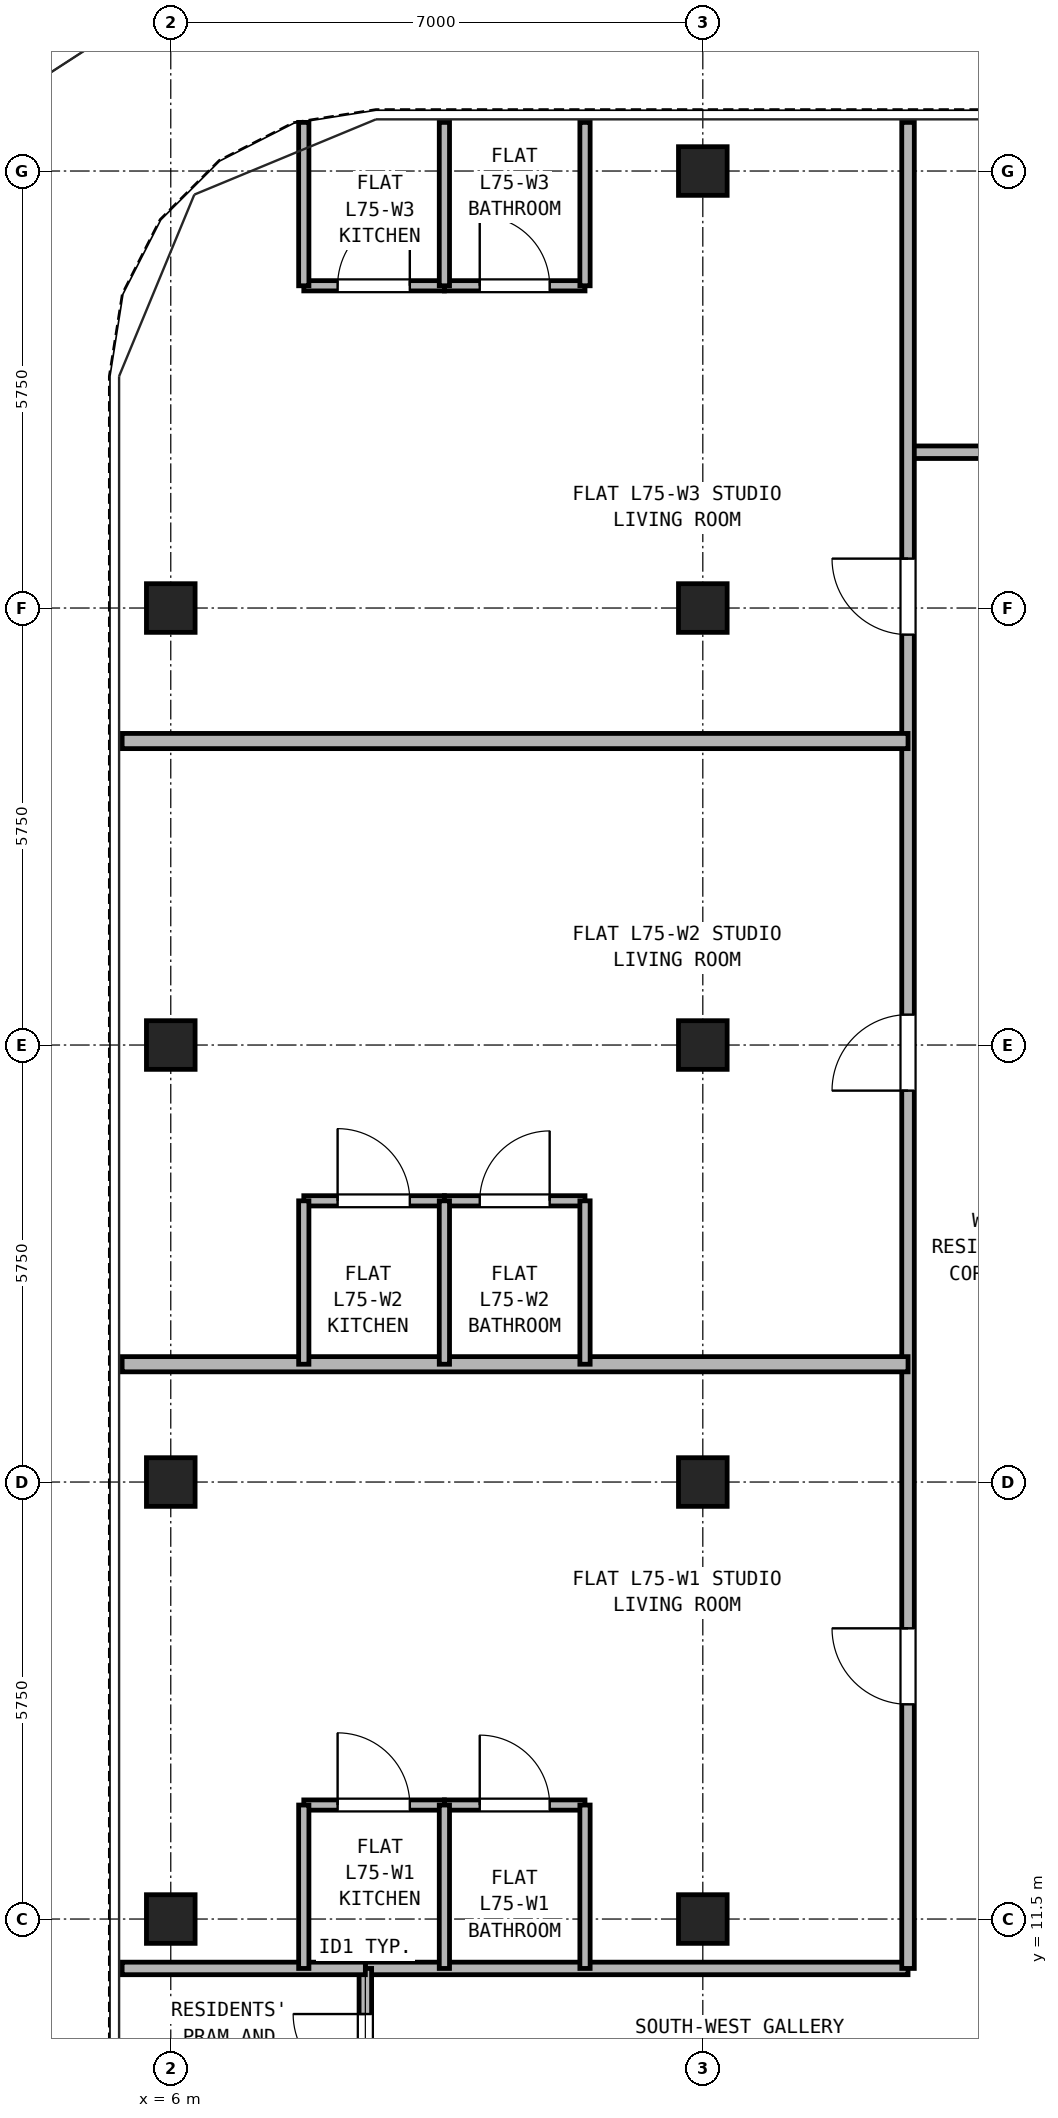
"""IFC4 building model, lengths in metres.
Left out: names, types, materials, properties, quantities, classifications, styles, units other than length and angle.
Written with IfcOpenShell. Run it as: python <this file> out.ifc"""

import sys

from ifc_helpers import new_model, si_unit, direction, frame, frame_2d, origin, origin_2d, place, context, subcontext, project, spatial, rectangle, hollow_rectangle, extrude, source, transform, mapped, element, fill, save


model = new_model("IFC4")
c1 = context("Model", 3, precision=1e-05, world=origin(), true_north=direction((0.0, 1.0)))
c2 = subcontext(c1, "Body", "Model", "MODEL_VIEW")
j1 = project(units=[si_unit("LENGTHUNIT", "METRE"), si_unit("PLANEANGLEUNIT", "RADIAN")], contexts=[c1])
p1 = place(None, origin())
s1 = spatial("IfcSite", under=j1, at=p1, CompositionType="ELEMENT")
p2 = place(p1, origin())
s2 = spatial("IfcBuilding", under=s1, at=p2, CompositionType="ELEMENT")
p3 = place(p2, frame((0.0, 0.0, 261.7)))
s3 = spatial("IfcBuildingStorey", under=s2, at=p3, CompositionType="ELEMENT", Elevation=261.7)
m1 = source(origin(), c2, "Body", "SweptSolid", [
    extrude(hollow_rectangle(XDim=0.64, YDim=0.64, WallThickness=0.035, at=origin_2d()), origin(), (0.0, 0.0, 1.0), 2.98),
])
for number, where, z_axis, x_axis in (
    (1, (13.0, 34.5, 0.0), (0.0, 0.0, 1.0), (1.0, 0.0, 0.0)),
    (2, (6.0, 11.5, 0.0), (0.0, 0.0, 1.0), (1.0, 0.0, 0.0)),
    (3, (6.0, 17.25, 0.0), (0.0, 0.0, 1.0), (1.0, 0.0, 0.0)),
    (4, (6.0, 23.0, 0.0), (0.0, 0.0, 1.0), (1.0, 0.0, 0.0)),
    (5, (6.0, 28.75, 0.0), (0.0, 0.0, 1.0), (1.0, 0.0, 0.0)),
    (6, (13.0, 11.5, 0.0), (0.0, 0.0, 1.0), (1.0, 0.0, 0.0)),
    (7, (13.0, 17.25, 0.0), (0.0, 0.0, 1.0), (1.0, 0.0, 0.0)),
    (8, (13.0, 23.0, 0.0), (0.0, 0.0, 1.0), (1.0, 0.0, 0.0)),
    (9, (13.0, 28.75, 0.0), (0.0, 0.0, 1.0), (1.0, 0.0, 0.0)),
):
    element("IfcColumn", number, at=place(p3, frame(where, z_axis=z_axis, x_axis=x_axis)), inside=s3, PredefinedType="COLUMN", context=c2, shape_type="MappedRepresentation", body=[
        mapped(m1, transform((0.0, 0.0, 0.0), x_axis=(1.0, 0.0, 0.0), y_axis=(0.0, 1.0, 0.0), z_axis=(0.0, 0.0, 1.0), scale=1.0)),
    ])
p4 = place(p3, frame((8.56, 10.85, 0.0), z_axis=(0.0, 0.0, 1.0), x_axis=(1.0, 0.0, 0.0)))
e10 = element("IfcWall", 10, at=p4, inside=s3, PredefinedType="PARTITIONING", context=c2, shape_type="SweptSolid", body=[
    extrude(rectangle(XDim=7.14, YDim=0.165, at=frame_2d((3.57, 0.0))), origin(), (0.0, 0.0, 1.0), 2.98),
])
p5 = place(p3, frame((8.56, 8.85, 0.0), z_axis=(0.0, 0.0, 1.0), x_axis=(0.0, 1.0, 0.0)))
e11 = element("IfcWall", 11, at=p5, inside=s3, PredefinedType="PARTITIONING", context=c2, shape_type="SweptSolid", body=[
    extrude(rectangle(XDim=2.0, YDim=0.165, at=frame_2d((1.0, 0.0))), origin(), (0.0, 0.0, 1.0), 2.98),
])
p6 = place(p5, frame((0.45, 0.0, 0.0)))
e12 = element("IfcOpeningElement", 12, at=p6, cuts=e11, PredefinedType="OPENING", context=c2, shape_type="SweptSolid", body=[
    extrude(rectangle(XDim=0.95, YDim=2.15, at=frame_2d((0.475, 1.075))), frame((0.0, 0.093, 0.0), z_axis=(0.0, -1.0, 0.0), x_axis=(1.0, 0.0, 0.0)), (0.0, 0.0, 1.0), 0.185),
])
p7 = place(p3, frame((15.7, 30.8, 0.0), z_axis=(0.0, 0.0, 1.0), x_axis=(1.0, 0.0, 0.0)))
e13 = element("IfcWall", 13, at=p7, inside=s3, PredefinedType="PARTITIONING", context=c2, shape_type="SweptSolid", body=[
    extrude(rectangle(XDim=15.6, YDim=0.165, at=frame_2d((7.8, 0.0))), origin(), (0.0, 0.0, 1.0), 2.98),
])
p8 = place(p7, frame((2.65, 0.0, 0.0)))
e14 = element("IfcOpeningElement", 14, at=p8, cuts=e13, PredefinedType="OPENING", context=c2, shape_type="SweptSolid", body=[
    extrude(rectangle(XDim=0.95, YDim=2.15, at=frame_2d((0.475, 1.075))), frame((0.0, 0.093, 0.0), z_axis=(0.0, -1.0, 0.0), x_axis=(1.0, 0.0, 0.0)), (0.0, 0.0, 1.0), 0.185),
])
p9 = place(p7, frame((7.85, 0.0, 0.0)))
e15 = element("IfcOpeningElement", 15, at=p9, cuts=e13, PredefinedType="OPENING", context=c2, shape_type="SweptSolid", body=[
    extrude(rectangle(XDim=0.95, YDim=2.15, at=frame_2d((0.475, 1.075))), frame((0.0, 0.093, 0.0), z_axis=(0.0, -1.0, 0.0), x_axis=(1.0, 0.0, 0.0)), (0.0, 0.0, 1.0), 0.185),
])
p10 = place(p7, frame((12.5, 0.0, 0.0)))
e16 = element("IfcOpeningElement", 16, at=p10, cuts=e13, PredefinedType="OPENING", context=c2, shape_type="SweptSolid", body=[
    extrude(rectangle(XDim=0.92, YDim=2.1, at=frame_2d((0.46, 1.05))), frame((0.0, 0.093, 0.0), z_axis=(0.0, -1.0, 0.0), x_axis=(1.0, 0.0, 0.0)), (0.0, 0.0, 1.0), 0.185),
])
p11 = place(p3, frame((15.7, 10.85, 0.0), z_axis=(0.0, 0.0, 1.0), x_axis=(0.0, 1.0, 0.0)))
e17 = element("IfcWall", 17, at=p11, inside=s3, PredefinedType="PARTITIONING", context=c2, shape_type="SweptSolid", body=[
    extrude(rectangle(XDim=24.29, YDim=0.165, at=frame_2d((12.145, 0.0))), origin(), (0.0, 0.0, 1.0), 2.98),
])
p12 = place(p11, frame((3.475, 0.0, 0.0)))
e18 = element("IfcOpeningElement", 18, at=p12, cuts=e17, PredefinedType="OPENING", context=c2, shape_type="SweptSolid", body=[
    extrude(rectangle(XDim=1.0, YDim=2.15, at=frame_2d((0.5, 1.075))), frame((0.0, 0.093, 0.0), z_axis=(0.0, -1.0, 0.0), x_axis=(1.0, 0.0, 0.0)), (0.0, 0.0, 1.0), 0.185),
])
p13 = place(p11, frame((11.55, 0.0, 0.0)))
e19 = element("IfcOpeningElement", 19, at=p13, cuts=e17, PredefinedType="OPENING", context=c2, shape_type="SweptSolid", body=[
    extrude(rectangle(XDim=1.0, YDim=2.15, at=frame_2d((0.5, 1.075))), frame((0.0, 0.093, 0.0), z_axis=(0.0, -1.0, 0.0), x_axis=(1.0, 0.0, 0.0)), (0.0, 0.0, 1.0), 0.185),
])
p14 = place(p11, frame((17.55, 0.0, 0.0)))
e20 = element("IfcOpeningElement", 20, at=p14, cuts=e17, PredefinedType="OPENING", context=c2, shape_type="SweptSolid", body=[
    extrude(rectangle(XDim=1.0, YDim=2.15, at=frame_2d((0.5, 1.075))), frame((0.0, 0.093, 0.0), z_axis=(0.0, -1.0, 0.0), x_axis=(1.0, 0.0, 0.0)), (0.0, 0.0, 1.0), 0.185),
])
p15 = place(p3, frame((5.36, 10.85, 0.0), z_axis=(0.0, 0.0, 1.0), x_axis=(1.0, 0.0, 0.0)))
e21 = element("IfcWall", 21, at=p15, inside=s3, PredefinedType="PARTITIONING", context=c2, shape_type="SweptSolid", body=[
    extrude(rectangle(XDim=3.2, YDim=0.165, at=frame_2d((1.6, 0.0))), origin(), (0.0, 0.0, 1.0), 2.98),
])
p16 = place(p3, frame((7.75, 13.0, 0.0), z_axis=(0.0, 0.0, 1.0), x_axis=(1.0, 0.0, 0.0)))
e22 = element("IfcWall", 22, at=p16, inside=s3, PredefinedType="PARTITIONING", context=c2, shape_type="SweptSolid", body=[
    extrude(rectangle(XDim=1.85, YDim=0.135, at=frame_2d((0.925, 0.0))), origin(), (0.0, 0.0, 1.0), 2.98),
])
p17 = place(p16, frame((0.445, 0.0, 0.0)))
e23 = element("IfcOpeningElement", 23, at=p17, cuts=e22, PredefinedType="OPENING", context=c2, shape_type="SweptSolid", body=[
    extrude(rectangle(XDim=0.95, YDim=2.15, at=frame_2d((0.475, 1.075))), frame((0.0, 0.077, 0.0), z_axis=(0.0, -1.0, 0.0), x_axis=(1.0, 0.0, 0.0)), (0.0, 0.0, 1.0), 0.155),
])
p18 = place(p3, frame((9.6, 13.0, 0.0), z_axis=(0.0, 0.0, 1.0), x_axis=(1.0, 0.0, 0.0)))
e24 = element("IfcWall", 24, at=p18, inside=s3, PredefinedType="PARTITIONING", context=c2, shape_type="SweptSolid", body=[
    extrude(rectangle(XDim=1.85, YDim=0.135, at=frame_2d((0.925, 0.0))), origin(), (0.0, 0.0, 1.0), 2.98),
])
p19 = place(p18, frame((0.465, 0.0, 0.0)))
e25 = element("IfcOpeningElement", 25, at=p19, cuts=e24, PredefinedType="OPENING", context=c2, shape_type="SweptSolid", body=[
    extrude(rectangle(XDim=0.92, YDim=2.1, at=frame_2d((0.46, 1.05))), frame((0.0, 0.077, 0.0), z_axis=(0.0, -1.0, 0.0), x_axis=(1.0, 0.0, 0.0)), (0.0, 0.0, 1.0), 0.155),
])
for number, where, z_axis, x_axis in (
    (26, (7.75, 10.85, 0.0), (0.0, 0.0, 1.0), (0.0, 1.0, 0.0)),
    (27, (9.6, 10.85, 0.0), (0.0, 0.0, 1.0), (0.0, 1.0, 0.0)),
    (28, (11.45, 10.85, 0.0), (0.0, 0.0, 1.0), (0.0, 1.0, 0.0)),
):
    element("IfcWall", number, at=place(p3, frame(where, z_axis=z_axis, x_axis=x_axis)), inside=s3, PredefinedType="PARTITIONING", context=c2, shape_type="SweptSolid", body=[
        extrude(rectangle(XDim=2.15, YDim=0.135, at=frame_2d((1.075, 0.0))), origin(), (0.0, 0.0, 1.0), 2.98),
    ])
p20 = place(p3, frame((5.36, 18.8, 0.0), z_axis=(0.0, 0.0, 1.0), x_axis=(1.0, 0.0, 0.0)))
e29 = element("IfcWall", 29, at=p20, inside=s3, PredefinedType="PARTITIONING", context=c2, shape_type="SweptSolid", body=[
    extrude(rectangle(XDim=10.34, YDim=0.2, at=frame_2d((5.17, 0.0))), origin(), (0.0, 0.0, 1.0), 2.98),
])
p21 = place(p3, frame((7.75, 20.95, 0.0), z_axis=(0.0, 0.0, 1.0), x_axis=(1.0, 0.0, 0.0)))
e30 = element("IfcWall", 30, at=p21, inside=s3, PredefinedType="PARTITIONING", context=c2, shape_type="SweptSolid", body=[
    extrude(rectangle(XDim=1.85, YDim=0.135, at=frame_2d((0.925, 0.0))), origin(), (0.0, 0.0, 1.0), 2.98),
])
p22 = place(p21, frame((0.445, 0.0, 0.0)))
e31 = element("IfcOpeningElement", 31, at=p22, cuts=e30, PredefinedType="OPENING", context=c2, shape_type="SweptSolid", body=[
    extrude(rectangle(XDim=0.95, YDim=2.15, at=frame_2d((0.475, 1.075))), frame((0.0, 0.077, 0.0), z_axis=(0.0, -1.0, 0.0), x_axis=(1.0, 0.0, 0.0)), (0.0, 0.0, 1.0), 0.155),
])
p23 = place(p3, frame((9.6, 20.95, 0.0), z_axis=(0.0, 0.0, 1.0), x_axis=(1.0, 0.0, 0.0)))
e32 = element("IfcWall", 32, at=p23, inside=s3, PredefinedType="PARTITIONING", context=c2, shape_type="SweptSolid", body=[
    extrude(rectangle(XDim=1.85, YDim=0.135, at=frame_2d((0.925, 0.0))), origin(), (0.0, 0.0, 1.0), 2.98),
])
p24 = place(p23, frame((0.465, 0.0, 0.0)))
e33 = element("IfcOpeningElement", 33, at=p24, cuts=e32, PredefinedType="OPENING", context=c2, shape_type="SweptSolid", body=[
    extrude(rectangle(XDim=0.92, YDim=2.1, at=frame_2d((0.46, 1.05))), frame((0.0, 0.077, 0.0), z_axis=(0.0, -1.0, 0.0), x_axis=(1.0, 0.0, 0.0)), (0.0, 0.0, 1.0), 0.155),
])
for number, where, z_axis, x_axis in (
    (34, (7.75, 18.8, 0.0), (0.0, 0.0, 1.0), (0.0, 1.0, 0.0)),
    (35, (9.6, 18.8, 0.0), (0.0, 0.0, 1.0), (0.0, 1.0, 0.0)),
    (36, (11.45, 18.8, 0.0), (0.0, 0.0, 1.0), (0.0, 1.0, 0.0)),
):
    element("IfcWall", number, at=place(p3, frame(where, z_axis=z_axis, x_axis=x_axis)), inside=s3, PredefinedType="PARTITIONING", context=c2, shape_type="SweptSolid", body=[
        extrude(rectangle(XDim=2.15, YDim=0.135, at=frame_2d((1.075, 0.0))), origin(), (0.0, 0.0, 1.0), 2.98),
    ])
p25 = place(p3, frame((5.36, 27.0, 0.0), z_axis=(0.0, 0.0, 1.0), x_axis=(1.0, 0.0, 0.0)))
e37 = element("IfcWall", 37, at=p25, inside=s3, PredefinedType="PARTITIONING", context=c2, shape_type="SweptSolid", body=[
    extrude(rectangle(XDim=10.34, YDim=0.2, at=frame_2d((5.17, 0.0))), origin(), (0.0, 0.0, 1.0), 2.98),
])
p26 = place(p3, frame((7.75, 32.99, 0.0), z_axis=(0.0, 0.0, 1.0), x_axis=(1.0, 0.0, 0.0)))
e38 = element("IfcWall", 38, at=p26, inside=s3, PredefinedType="PARTITIONING", context=c2, shape_type="SweptSolid", body=[
    extrude(rectangle(XDim=1.85, YDim=0.135, at=frame_2d((0.925, 0.0))), origin(), (0.0, 0.0, 1.0), 2.98),
])
p27 = place(p26, frame((0.445, 0.0, 0.0)))
e39 = element("IfcOpeningElement", 39, at=p27, cuts=e38, PredefinedType="OPENING", context=c2, shape_type="SweptSolid", body=[
    extrude(rectangle(XDim=0.95, YDim=2.15, at=frame_2d((0.475, 1.075))), frame((0.0, 0.077, 0.0), z_axis=(0.0, -1.0, 0.0), x_axis=(1.0, 0.0, 0.0)), (0.0, 0.0, 1.0), 0.155),
])
p28 = place(p3, frame((9.6, 32.99, 0.0), z_axis=(0.0, 0.0, 1.0), x_axis=(1.0, 0.0, 0.0)))
e40 = element("IfcWall", 40, at=p28, inside=s3, PredefinedType="PARTITIONING", context=c2, shape_type="SweptSolid", body=[
    extrude(rectangle(XDim=1.85, YDim=0.135, at=frame_2d((0.925, 0.0))), origin(), (0.0, 0.0, 1.0), 2.98),
])
p29 = place(p28, frame((0.465, 0.0, 0.0)))
e41 = element("IfcOpeningElement", 41, at=p29, cuts=e40, PredefinedType="OPENING", context=c2, shape_type="SweptSolid", body=[
    extrude(rectangle(XDim=0.92, YDim=2.1, at=frame_2d((0.46, 1.05))), frame((0.0, 0.077, 0.0), z_axis=(0.0, -1.0, 0.0), x_axis=(1.0, 0.0, 0.0)), (0.0, 0.0, 1.0), 0.155),
])
for number, where, z_axis, x_axis in (
    (42, (7.75, 32.99, 0.0), (0.0, 0.0, 1.0), (0.0, 1.0, 0.0)),
    (43, (9.6, 32.99, 0.0), (0.0, 0.0, 1.0), (0.0, 1.0, 0.0)),
    (44, (11.45, 32.99, 0.0), (0.0, 0.0, 1.0), (0.0, 1.0, 0.0)),
):
    element("IfcWall", number, at=place(p3, frame(where, z_axis=z_axis, x_axis=x_axis)), inside=s3, PredefinedType="PARTITIONING", context=c2, shape_type="SweptSolid", body=[
        extrude(rectangle(XDim=2.15, YDim=0.135, at=frame_2d((1.075, 0.0))), origin(), (0.0, 0.0, 1.0), 2.98),
    ])
p30 = place(p6, frame((0.95, 0.0, 0.0), z_axis=(0.0, 0.0, 1.0), x_axis=(-1.0, 0.0, 0.0)))
e45 = element("IfcDoor", 45, at=p30, inside=s3, OperationType="SINGLE_SWING_RIGHT", PredefinedType="DOOR", context=c2, shape_type="SweptSolid", body=[
    extrude(rectangle(XDim=0.95, YDim=2.15, at=frame_2d((0.475, 1.075))), frame((0.0, 0.025, 0.0), z_axis=(0.0, -1.0, 0.0), x_axis=(1.0, 0.0, 0.0)), (0.0, 0.0, 1.0), 0.05),
])
fill(e12, e45)
p31 = place(p17, origin())
e46 = element("IfcDoor", 46, at=p31, inside=s3, OperationType="SINGLE_SWING_LEFT", PredefinedType="DOOR", context=c2, shape_type="SweptSolid", body=[
    extrude(rectangle(XDim=0.95, YDim=2.15, at=frame_2d((0.475, 1.075))), frame((0.0, 0.025, 0.0), z_axis=(0.0, -1.0, 0.0), x_axis=(1.0, 0.0, 0.0)), (0.0, 0.0, 1.0), 0.05),
])
fill(e23, e46)
p32 = place(p19, origin())
e47 = element("IfcDoor", 47, at=p32, inside=s3, OperationType="SINGLE_SWING_LEFT", PredefinedType="DOOR", context=c2, shape_type="SweptSolid", body=[
    extrude(rectangle(XDim=0.92, YDim=2.1, at=frame_2d((0.46, 1.05))), frame((0.0, 0.025, 0.0), z_axis=(0.0, -1.0, 0.0), x_axis=(1.0, 0.0, 0.0)), (0.0, 0.0, 1.0), 0.05),
])
fill(e25, e47)
p33 = place(p12, origin())
e48 = element("IfcDoor", 48, at=p33, inside=s3, OperationType="SINGLE_SWING_RIGHT", PredefinedType="DOOR", context=c2, shape_type="SweptSolid", body=[
    extrude(rectangle(XDim=1.0, YDim=2.15, at=frame_2d((0.5, 1.075))), frame((0.0, 0.025, 0.0), z_axis=(0.0, -1.0, 0.0), x_axis=(1.0, 0.0, 0.0)), (0.0, 0.0, 1.0), 0.05),
])
fill(e18, e48)
p34 = place(p22, origin())
e49 = element("IfcDoor", 49, at=p34, inside=s3, OperationType="SINGLE_SWING_LEFT", PredefinedType="DOOR", context=c2, shape_type="SweptSolid", body=[
    extrude(rectangle(XDim=0.95, YDim=2.15, at=frame_2d((0.475, 1.075))), frame((0.0, 0.025, 0.0), z_axis=(0.0, -1.0, 0.0), x_axis=(1.0, 0.0, 0.0)), (0.0, 0.0, 1.0), 0.05),
])
fill(e31, e49)
p35 = place(p24, origin())
e50 = element("IfcDoor", 50, at=p35, inside=s3, OperationType="SINGLE_SWING_RIGHT", PredefinedType="DOOR", context=c2, shape_type="SweptSolid", body=[
    extrude(rectangle(XDim=0.92, YDim=2.1, at=frame_2d((0.46, 1.05))), frame((0.0, 0.025, 0.0), z_axis=(0.0, -1.0, 0.0), x_axis=(1.0, 0.0, 0.0)), (0.0, 0.0, 1.0), 0.05),
])
fill(e33, e50)
p36 = place(p13, origin())
e51 = element("IfcDoor", 51, at=p36, inside=s3, OperationType="SINGLE_SWING_LEFT", PredefinedType="DOOR", context=c2, shape_type="SweptSolid", body=[
    extrude(rectangle(XDim=1.0, YDim=2.15, at=frame_2d((0.5, 1.075))), frame((0.0, 0.025, 0.0), z_axis=(0.0, -1.0, 0.0), x_axis=(1.0, 0.0, 0.0)), (0.0, 0.0, 1.0), 0.05),
])
fill(e19, e51)
p37 = place(p27, frame((0.95, 0.0, 0.0), z_axis=(0.0, 0.0, 1.0), x_axis=(-1.0, 0.0, 0.0)))
e52 = element("IfcDoor", 52, at=p37, inside=s3, OperationType="SINGLE_SWING_RIGHT", PredefinedType="DOOR", context=c2, shape_type="SweptSolid", body=[
    extrude(rectangle(XDim=0.95, YDim=2.15, at=frame_2d((0.475, 1.075))), frame((0.0, 0.025, 0.0), z_axis=(0.0, -1.0, 0.0), x_axis=(1.0, 0.0, 0.0)), (0.0, 0.0, 1.0), 0.05),
])
fill(e39, e52)
p38 = place(p29, frame((0.92, 0.0, 0.0), z_axis=(0.0, 0.0, 1.0), x_axis=(-1.0, 0.0, 0.0)))
e53 = element("IfcDoor", 53, at=p38, inside=s3, OperationType="SINGLE_SWING_LEFT", PredefinedType="DOOR", context=c2, shape_type="SweptSolid", body=[
    extrude(rectangle(XDim=0.92, YDim=2.1, at=frame_2d((0.46, 1.05))), frame((0.0, 0.025, 0.0), z_axis=(0.0, -1.0, 0.0), x_axis=(1.0, 0.0, 0.0)), (0.0, 0.0, 1.0), 0.05),
])
fill(e41, e53)
p39 = place(p14, origin())
e54 = element("IfcDoor", 54, at=p39, inside=s3, OperationType="SINGLE_SWING_RIGHT", PredefinedType="DOOR", context=c2, shape_type="SweptSolid", body=[
    extrude(rectangle(XDim=1.0, YDim=2.15, at=frame_2d((0.5, 1.075))), frame((0.0, 0.025, 0.0), z_axis=(0.0, -1.0, 0.0), x_axis=(1.0, 0.0, 0.0)), (0.0, 0.0, 1.0), 0.05),
])
fill(e20, e54)
save(model, sys.argv[1])
